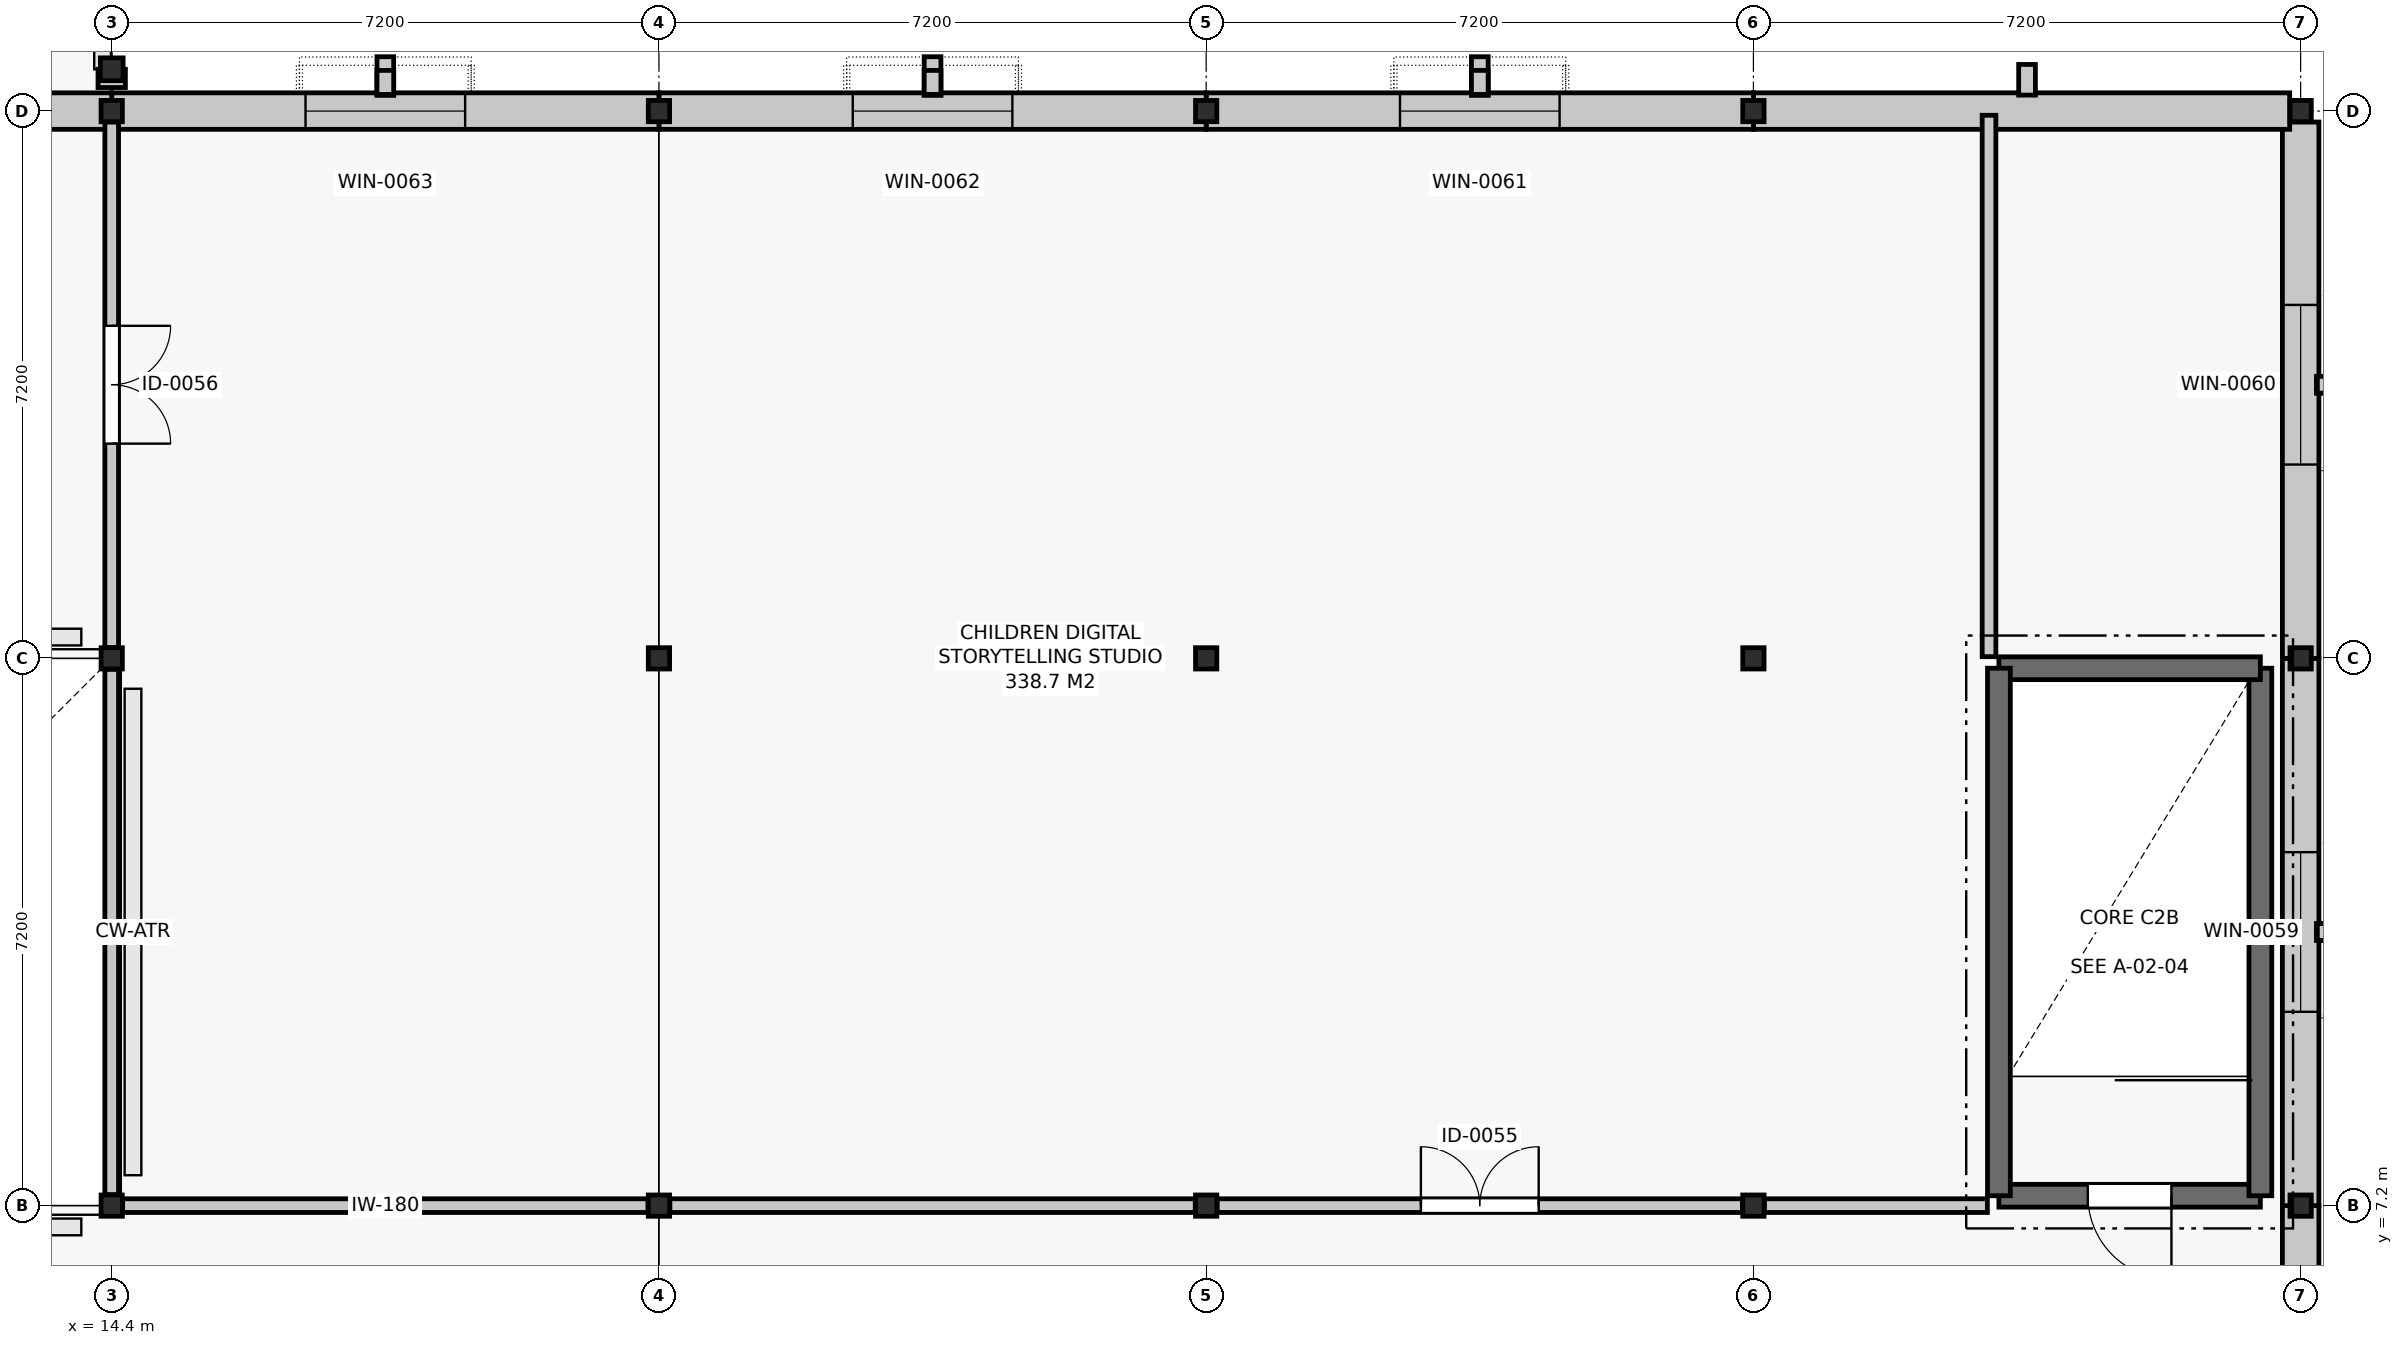
"""IFC4 building model, lengths in metres.
Left out: names, types, materials, properties, quantities, classifications, styles, units other than length and angle.
Written with IfcOpenShell. Run it as: python <this file> out.ifc"""

import sys

from ifc_helpers import new_model, si_unit, direction, frame, frame_2d, origin, origin_2d, place, context, subcontext, project, spatial, rectangle, i_section, extrude, element, fill, save


model = new_model("IFC4")
c1 = context("Model", 3, precision=1e-05, world=origin(), true_north=direction((0.0, 1.0)))
c2 = subcontext(c1, "Body", "Model", "MODEL_VIEW")
j1 = project(units=[si_unit("LENGTHUNIT", "METRE"), si_unit("PLANEANGLEUNIT", "RADIAN")], contexts=[c1])
p1 = place(None, origin())
s1 = spatial("IfcSite", under=j1, at=p1, CompositionType="ELEMENT")
p2 = place(p1, origin())
s2 = spatial("IfcBuilding", under=s1, at=p2, CompositionType="ELEMENT")
p3 = place(p2, frame((0.0, 0.0, 5.4)))
s3 = spatial("IfcBuildingStorey", under=s2, at=p3, CompositionType="ELEMENT", Elevation=5.4)
for number, where, z_axis, x_axis in (
    (1, (14.4, 7.2, 0.0), (0.0, 0.0, 1.0), (1.0, 0.0, 0.0)),
    (2, (14.4, 14.4, 0.0), (0.0, 0.0, 1.0), (1.0, 0.0, 0.0)),
    (3, (14.4, 21.6, 0.0), (0.0, 0.0, 1.0), (1.0, 0.0, 0.0)),
    (4, (21.6, 7.2, 0.0), (0.0, 0.0, 1.0), (1.0, 0.0, 0.0)),
    (5, (21.6, 14.4, 0.0), (0.0, 0.0, 1.0), (1.0, 0.0, 0.0)),
    (6, (21.6, 21.6, 0.0), (0.0, 0.0, 1.0), (1.0, 0.0, 0.0)),
    (7, (28.8, 7.2, 0.0), (0.0, 0.0, 1.0), (1.0, 0.0, 0.0)),
    (8, (28.8, 14.4, 0.0), (0.0, 0.0, 1.0), (1.0, 0.0, 0.0)),
    (9, (28.8, 21.6, 0.0), (0.0, 0.0, 1.0), (1.0, 0.0, 0.0)),
    (10, (36.0, 7.2, 0.0), (0.0, 0.0, 1.0), (1.0, 0.0, 0.0)),
    (11, (36.0, 14.4, 0.0), (0.0, 0.0, 1.0), (1.0, 0.0, 0.0)),
    (12, (36.0, 21.6, 0.0), (0.0, 0.0, 1.0), (1.0, 0.0, 0.0)),
    (13, (43.2, 7.2, 0.0), (0.0, 0.0, 1.0), (1.0, 0.0, 0.0)),
    (14, (43.2, 14.4, 0.0), (0.0, 0.0, 1.0), (1.0, 0.0, 0.0)),
    (15, (43.2, 21.6, 0.0), (0.0, 0.0, 1.0), (1.0, 0.0, 0.0)),
):
    element("IfcColumn", number, at=place(p3, frame(where, z_axis=z_axis, x_axis=x_axis)), inside=s3, PredefinedType="COLUMN", context=c2, shape_type="SweptSolid", body=[
        extrude(i_section(OverallWidth=0.28, OverallDepth=0.28, WebThickness=0.01, FlangeThickness=0.018, FilletRadius=0.024, at=origin_2d()), origin(), (0.0, 0.0, 1.0), 4.8),
    ])
p4 = place(p3, frame((14.4, 22.15, 0.0), z_axis=(0.0, 0.0, 1.0), x_axis=(1.0, 0.0, 0.0)))
e16 = element("IfcColumn", 16, at=p4, inside=s3, PredefinedType="COLUMN", context=c2, shape_type="SweptSolid", body=[
    extrude(i_section(OverallWidth=0.3, OverallDepth=0.3, WebThickness=0.011, FlangeThickness=0.019, FilletRadius=0.027, at=origin_2d()), origin(), (0.0, 0.0, 1.0), 4.8),
])
p5 = place(p3, frame((43.2, 0.144, 0.0), z_axis=(0.0, 0.0, 1.0), x_axis=(0.0, 1.0, 0.0)))
e17 = element("IfcWall", 17, at=p5, inside=s3, PredefinedType="SOLIDWALL", context=c2, shape_type="SweptSolid", body=[
    extrude(rectangle(XDim=7.056, YDim=0.48, at=frame_2d((3.528, 0.0))), origin(), (0.0, 0.0, 1.0), 3.8),
])
p6 = place(p5, frame((2.406, 0.0, 0.9)))
e18 = element("IfcOpeningElement", 18, at=p6, cuts=e17, PredefinedType="OPENING", context=c2, shape_type="SweptSolid", body=[
    extrude(rectangle(XDim=2.1, YDim=2.1, at=frame_2d((1.05, 1.05))), frame((0.0, 0.252, 0.0), z_axis=(0.0, -1.0, 0.0), x_axis=(1.0, 0.0, 0.0)), (0.0, 0.0, 1.0), 0.504),
])
p7 = place(p3, frame((43.2, 7.2, 0.0), z_axis=(0.0, 0.0, 1.0), x_axis=(0.0, 1.0, 0.0)))
e19 = element("IfcWall", 19, at=p7, inside=s3, PredefinedType="SOLIDWALL", context=c2, shape_type="SweptSolid", body=[
    extrude(rectangle(XDim=7.2, YDim=0.48, at=frame_2d((3.6, 0.0))), origin(), (0.0, 0.0, 1.0), 3.8),
])
p8 = place(p7, frame((2.55, 0.0, 0.9)))
e20 = element("IfcOpeningElement", 20, at=p8, cuts=e19, PredefinedType="OPENING", context=c2, shape_type="SweptSolid", body=[
    extrude(rectangle(XDim=2.1, YDim=2.1, at=frame_2d((1.05, 1.05))), frame((0.0, 0.252, 0.0), z_axis=(0.0, -1.0, 0.0), x_axis=(1.0, 0.0, 0.0)), (0.0, 0.0, 1.0), 0.504),
])
p9 = place(p3, frame((43.2, 14.4, 0.0), z_axis=(0.0, 0.0, 1.0), x_axis=(0.0, 1.0, 0.0)))
e21 = element("IfcWall", 21, at=p9, inside=s3, PredefinedType="SOLIDWALL", context=c2, shape_type="SweptSolid", body=[
    extrude(rectangle(XDim=7.056, YDim=0.48, at=frame_2d((3.528, 0.0))), origin(), (0.0, 0.0, 1.0), 3.8),
])
p10 = place(p9, frame((2.55, 0.0, 0.9)))
e22 = element("IfcOpeningElement", 22, at=p10, cuts=e21, PredefinedType="OPENING", context=c2, shape_type="SweptSolid", body=[
    extrude(rectangle(XDim=2.1, YDim=2.1, at=frame_2d((1.05, 1.05))), frame((0.0, 0.252, 0.0), z_axis=(0.0, -1.0, 0.0), x_axis=(1.0, 0.0, 0.0)), (0.0, 0.0, 1.0), 0.504),
])
p11 = place(p3, frame((43.056, 21.6, 0.0), z_axis=(0.0, 0.0, 1.0), x_axis=(-1.0, 0.0, 0.0)))
e23 = element("IfcWall", 23, at=p11, inside=s3, PredefinedType="SOLIDWALL", context=c2, shape_type="SweptSolid", body=[
    extrude(rectangle(XDim=7.056, YDim=0.48, at=frame_2d((3.528, 0.0))), origin(), (0.0, 0.0, 1.0), 3.8),
])
p12 = place(p3, frame((36.0, 21.6, 0.0), z_axis=(0.0, 0.0, 1.0), x_axis=(-1.0, 0.0, 0.0)))
e24 = element("IfcWall", 24, at=p12, inside=s3, PredefinedType="SOLIDWALL", context=c2, shape_type="SweptSolid", body=[
    extrude(rectangle(XDim=7.2, YDim=0.48, at=frame_2d((3.6, 0.0))), origin(), (0.0, 0.0, 1.0), 3.8),
])
p13 = place(p12, frame((2.55, 0.0, 0.9)))
e25 = element("IfcOpeningElement", 25, at=p13, cuts=e24, PredefinedType="OPENING", context=c2, shape_type="SweptSolid", body=[
    extrude(rectangle(XDim=2.1, YDim=2.1, at=frame_2d((1.05, 1.05))), frame((0.0, 0.252, 0.0), z_axis=(0.0, -1.0, 0.0), x_axis=(1.0, 0.0, 0.0)), (0.0, 0.0, 1.0), 0.504),
])
p14 = place(p3, frame((28.8, 21.6, 0.0), z_axis=(0.0, 0.0, 1.0), x_axis=(-1.0, 0.0, 0.0)))
e26 = element("IfcWall", 26, at=p14, inside=s3, PredefinedType="SOLIDWALL", context=c2, shape_type="SweptSolid", body=[
    extrude(rectangle(XDim=7.2, YDim=0.48, at=frame_2d((3.6, 0.0))), origin(), (0.0, 0.0, 1.0), 3.8),
])
p15 = place(p14, frame((2.55, 0.0, 0.9)))
e27 = element("IfcOpeningElement", 27, at=p15, cuts=e26, PredefinedType="OPENING", context=c2, shape_type="SweptSolid", body=[
    extrude(rectangle(XDim=2.1, YDim=2.1, at=frame_2d((1.05, 1.05))), frame((0.0, 0.252, 0.0), z_axis=(0.0, -1.0, 0.0), x_axis=(1.0, 0.0, 0.0)), (0.0, 0.0, 1.0), 0.504),
])
p16 = place(p3, frame((21.6, 21.6, 0.0), z_axis=(0.0, 0.0, 1.0), x_axis=(-1.0, 0.0, 0.0)))
e28 = element("IfcWall", 28, at=p16, inside=s3, PredefinedType="SOLIDWALL", context=c2, shape_type="SweptSolid", body=[
    extrude(rectangle(XDim=7.2, YDim=0.48, at=frame_2d((3.6, 0.0))), origin(), (0.0, 0.0, 1.0), 3.8),
])
p17 = place(p16, frame((2.55, 0.0, 0.9)))
e29 = element("IfcOpeningElement", 29, at=p17, cuts=e28, PredefinedType="OPENING", context=c2, shape_type="SweptSolid", body=[
    extrude(rectangle(XDim=2.1, YDim=2.1, at=frame_2d((1.05, 1.05))), frame((0.0, 0.252, 0.0), z_axis=(0.0, -1.0, 0.0), x_axis=(1.0, 0.0, 0.0)), (0.0, 0.0, 1.0), 0.504),
])
p18 = place(p3, frame((14.4, 21.6, 0.0), z_axis=(0.0, 0.0, 1.0), x_axis=(-1.0, 0.0, 0.0)))
e30 = element("IfcWall", 30, at=p18, inside=s3, PredefinedType="SOLIDWALL", context=c2, shape_type="SweptSolid", body=[
    extrude(rectangle(XDim=7.2, YDim=0.48, at=frame_2d((3.6, 0.0))), origin(), (0.0, 0.0, 1.0), 3.8),
])
p19 = place(p18, frame((2.7, 0.0, 0.0)))
e31 = element("IfcOpeningElement", 31, at=p19, cuts=e30, PredefinedType="OPENING", context=c2, shape_type="SweptSolid", body=[
    extrude(rectangle(XDim=1.8, YDim=2.3, at=frame_2d((0.9, 1.15))), frame((0.0, 0.252, 0.0), z_axis=(0.0, -1.0, 0.0), x_axis=(1.0, 0.0, 0.0)), (0.0, 0.0, 1.0), 0.504),
])
p20 = place(p3, frame((39.23, 7.33, 0.0), z_axis=(0.0, 0.0, 1.0), x_axis=(1.0, 0.0, 0.0)))
e32 = element("IfcWall", 32, at=p20, inside=s3, PredefinedType="SHEAR", context=c2, shape_type="SweptSolid", body=[
    extrude(rectangle(XDim=3.44, YDim=0.3, at=frame_2d((1.72, 0.0))), origin(), (0.0, 0.0, 1.0), 4.52),
])
p21 = place(p20, frame((1.17, 0.0, 0.0)))
e33 = element("IfcOpeningElement", 33, at=p21, cuts=e32, PredefinedType="OPENING", context=c2, shape_type="SweptSolid", body=[
    extrude(rectangle(XDim=1.1, YDim=2.15, at=frame_2d((0.55, 1.075))), frame((0.0, 0.162, 0.0), z_axis=(0.0, -1.0, 0.0), x_axis=(1.0, 0.0, 0.0)), (0.0, 0.0, 1.0), 0.324),
])
p22 = place(p3, frame((42.67, 7.33, 0.0), z_axis=(0.0, 0.0, 1.0), x_axis=(0.0, 1.0, 0.0)))
e34 = element("IfcWall", 34, at=p22, inside=s3, PredefinedType="SHEAR", context=c2, shape_type="SweptSolid", body=[
    extrude(rectangle(XDim=6.94, YDim=0.3, at=frame_2d((3.47, 0.0))), origin(), (0.0, 0.0, 1.0), 4.52),
])
p23 = place(p3, frame((42.67, 14.27, 0.0), z_axis=(0.0, 0.0, 1.0), x_axis=(-1.0, 0.0, 0.0)))
e35 = element("IfcWall", 35, at=p23, inside=s3, PredefinedType="SHEAR", context=c2, shape_type="SweptSolid", body=[
    extrude(rectangle(XDim=3.44, YDim=0.3, at=frame_2d((1.72, 0.0))), origin(), (0.0, 0.0, 1.0), 4.52),
])
p24 = place(p3, frame((39.23, 14.27, 0.0), z_axis=(0.0, 0.0, 1.0), x_axis=(0.0, -1.0, 0.0)))
e36 = element("IfcWall", 36, at=p24, inside=s3, PredefinedType="SHEAR", context=c2, shape_type="SweptSolid", body=[
    extrude(rectangle(XDim=6.94, YDim=0.3, at=frame_2d((3.47, 0.0))), origin(), (0.0, 0.0, 1.0), 4.52),
])
for number, where, z_axis, x_axis in (
    (37, (14.544, 7.2, 0.0), (0.0, 0.0, 1.0), (1.0, 0.0, 0.0)),
    (38, (21.744, 7.2, 0.0), (0.0, 0.0, 1.0), (1.0, 0.0, 0.0)),
):
    element("IfcWall", number, at=place(p3, frame(where, z_axis=z_axis, x_axis=x_axis)), inside=s3, PredefinedType="PARTITIONING", context=c2, shape_type="SweptSolid", body=[
        extrude(rectangle(XDim=6.912, YDim=0.18, at=frame_2d((3.456, 0.0))), origin(), (0.0, 0.0, 1.0), 4.005),
    ])
p25 = place(p3, frame((28.944, 7.2, 0.0), z_axis=(0.0, 0.0, 1.0), x_axis=(1.0, 0.0, 0.0)))
e39 = element("IfcWall", 39, at=p25, inside=s3, PredefinedType="PARTITIONING", context=c2, shape_type="SweptSolid", body=[
    extrude(rectangle(XDim=6.912, YDim=0.18, at=frame_2d((3.456, 0.0))), origin(), (0.0, 0.0, 1.0), 4.005),
])
p26 = place(p25, frame((2.681, 0.0, 0.0)))
e40 = element("IfcOpeningElement", 40, at=p26, cuts=e39, PredefinedType="OPENING", context=c2, shape_type="SweptSolid", body=[
    extrude(rectangle(XDim=1.55, YDim=2.2, at=frame_2d((0.775, 1.1))), frame((0.0, 0.102, 0.0), z_axis=(0.0, -1.0, 0.0), x_axis=(1.0, 0.0, 0.0)), (0.0, 0.0, 1.0), 0.204),
])
p27 = place(p3, frame((36.144, 7.2, 0.0), z_axis=(0.0, 0.0, 1.0), x_axis=(1.0, 0.0, 0.0)))
e41 = element("IfcWall", 41, at=p27, inside=s3, PredefinedType="PARTITIONING", context=c2, shape_type="SweptSolid", body=[
    extrude(rectangle(XDim=2.934, YDim=0.18, at=frame_2d((1.467, 0.0))), origin(), (0.0, 0.0, 1.0), 4.005),
])
p28 = place(p3, frame((14.4, 7.344, 0.0), z_axis=(0.0, 0.0, 1.0), x_axis=(0.0, 1.0, 0.0)))
e42 = element("IfcWall", 42, at=p28, inside=s3, PredefinedType="PARTITIONING", context=c2, shape_type="SweptSolid", body=[
    extrude(rectangle(XDim=6.912, YDim=0.18, at=frame_2d((3.456, 0.0))), origin(), (0.0, 0.0, 1.0), 4.065),
])
p29 = place(p3, frame((14.4, 14.544, 0.0), z_axis=(0.0, 0.0, 1.0), x_axis=(0.0, 1.0, 0.0)))
e43 = element("IfcWall", 43, at=p29, inside=s3, PredefinedType="PARTITIONING", context=c2, shape_type="SweptSolid", body=[
    extrude(rectangle(XDim=6.912, YDim=0.18, at=frame_2d((3.456, 0.0))), origin(), (0.0, 0.0, 1.0), 4.065),
])
p30 = place(p29, frame((2.681, 0.0, 0.0)))
e44 = element("IfcOpeningElement", 44, at=p30, cuts=e43, PredefinedType="OPENING", context=c2, shape_type="SweptSolid", body=[
    extrude(rectangle(XDim=1.55, YDim=2.2, at=frame_2d((0.775, 1.1))), frame((0.0, 0.102, 0.0), z_axis=(0.0, -1.0, 0.0), x_axis=(1.0, 0.0, 0.0)), (0.0, 0.0, 1.0), 0.204),
])
p31 = place(p3, frame((39.1, 14.422, 0.0), z_axis=(0.0, 0.0, 1.0), x_axis=(0.0, 1.0, 0.0)))
e45 = element("IfcWall", 45, at=p31, inside=s3, PredefinedType="PARTITIONING", context=c2, shape_type="SweptSolid", body=[
    extrude(rectangle(XDim=7.123, YDim=0.18, at=frame_2d((3.562, 0.0))), origin(), (0.0, 0.0, 1.0), 3.895),
])
p32 = place(p8, origin())
e46 = element("IfcWindow", 46, at=p32, inside=s3, PartitioningType="SINGLE_PANEL", PredefinedType="WINDOW", context=c2, shape_type="SweptSolid", body=[
    extrude(rectangle(XDim=2.1, YDim=2.1, at=frame_2d((1.05, 1.05))), frame((0.0, 0.03, 0.0), z_axis=(0.0, -1.0, 0.0), x_axis=(1.0, 0.0, 0.0)), (0.0, 0.0, 1.0), 0.06),
])
fill(e20, e46)
p33 = place(p10, origin())
e47 = element("IfcWindow", 47, at=p33, inside=s3, PartitioningType="SINGLE_PANEL", PredefinedType="WINDOW", context=c2, shape_type="SweptSolid", body=[
    extrude(rectangle(XDim=2.1, YDim=2.1, at=frame_2d((1.05, 1.05))), frame((0.0, 0.03, 0.0), z_axis=(0.0, -1.0, 0.0), x_axis=(1.0, 0.0, 0.0)), (0.0, 0.0, 1.0), 0.06),
])
fill(e22, e47)
p34 = place(p13, origin())
e48 = element("IfcWindow", 48, at=p34, inside=s3, PartitioningType="SINGLE_PANEL", PredefinedType="WINDOW", context=c2, shape_type="SweptSolid", body=[
    extrude(rectangle(XDim=2.1, YDim=2.1, at=frame_2d((1.05, 1.05))), frame((0.0, 0.03, 0.0), z_axis=(0.0, -1.0, 0.0), x_axis=(1.0, 0.0, 0.0)), (0.0, 0.0, 1.0), 0.06),
])
fill(e25, e48)
p35 = place(p15, origin())
e49 = element("IfcWindow", 49, at=p35, inside=s3, PartitioningType="SINGLE_PANEL", PredefinedType="WINDOW", context=c2, shape_type="SweptSolid", body=[
    extrude(rectangle(XDim=2.1, YDim=2.1, at=frame_2d((1.05, 1.05))), frame((0.0, 0.03, 0.0), z_axis=(0.0, -1.0, 0.0), x_axis=(1.0, 0.0, 0.0)), (0.0, 0.0, 1.0), 0.06),
])
fill(e27, e49)
p36 = place(p17, origin())
e50 = element("IfcWindow", 50, at=p36, inside=s3, PartitioningType="SINGLE_PANEL", PredefinedType="WINDOW", context=c2, shape_type="SweptSolid", body=[
    extrude(rectangle(XDim=2.1, YDim=2.1, at=frame_2d((1.05, 1.05))), frame((0.0, 0.03, 0.0), z_axis=(0.0, -1.0, 0.0), x_axis=(1.0, 0.0, 0.0)), (0.0, 0.0, 1.0), 0.06),
])
fill(e29, e50)
p37 = place(p21, frame((1.1, 0.0, 0.0), z_axis=(0.0, 0.0, 1.0), x_axis=(-1.0, 0.0, 0.0)))
e51 = element("IfcDoor", 51, at=p37, inside=s3, OperationType="SINGLE_SWING_LEFT", PredefinedType="DOOR", context=c2, shape_type="SweptSolid", body=[
    extrude(rectangle(XDim=1.1, YDim=2.15, at=frame_2d((0.55, 1.075))), frame((0.0, 0.025, 0.0), z_axis=(0.0, -1.0, 0.0), x_axis=(1.0, 0.0, 0.0)), (0.0, 0.0, 1.0), 0.05),
])
fill(e33, e51)
p38 = place(p26, origin())
e52 = element("IfcDoor", 52, at=p38, inside=s3, OperationType="DOUBLE_DOOR_SINGLE_SWING", PredefinedType="DOOR", context=c2, shape_type="SweptSolid", body=[
    extrude(rectangle(XDim=1.55, YDim=2.2, at=frame_2d((0.775, 1.1))), frame((0.0, 0.025, 0.0), z_axis=(0.0, -1.0, 0.0), x_axis=(1.0, 0.0, 0.0)), (0.0, 0.0, 1.0), 0.05),
])
fill(e40, e52)
p39 = place(p30, frame((1.55, 0.0, 0.0), z_axis=(0.0, 0.0, 1.0), x_axis=(-1.0, 0.0, 0.0)))
e53 = element("IfcDoor", 53, at=p39, inside=s3, OperationType="DOUBLE_DOOR_SINGLE_SWING", PredefinedType="DOOR", context=c2, shape_type="SweptSolid", body=[
    extrude(rectangle(XDim=1.55, YDim=2.2, at=frame_2d((0.775, 1.1))), frame((0.0, 0.025, 0.0), z_axis=(0.0, -1.0, 0.0), x_axis=(1.0, 0.0, 0.0)), (0.0, 0.0, 1.0), 0.05),
])
fill(e44, e53)
save(model, sys.argv[1])
